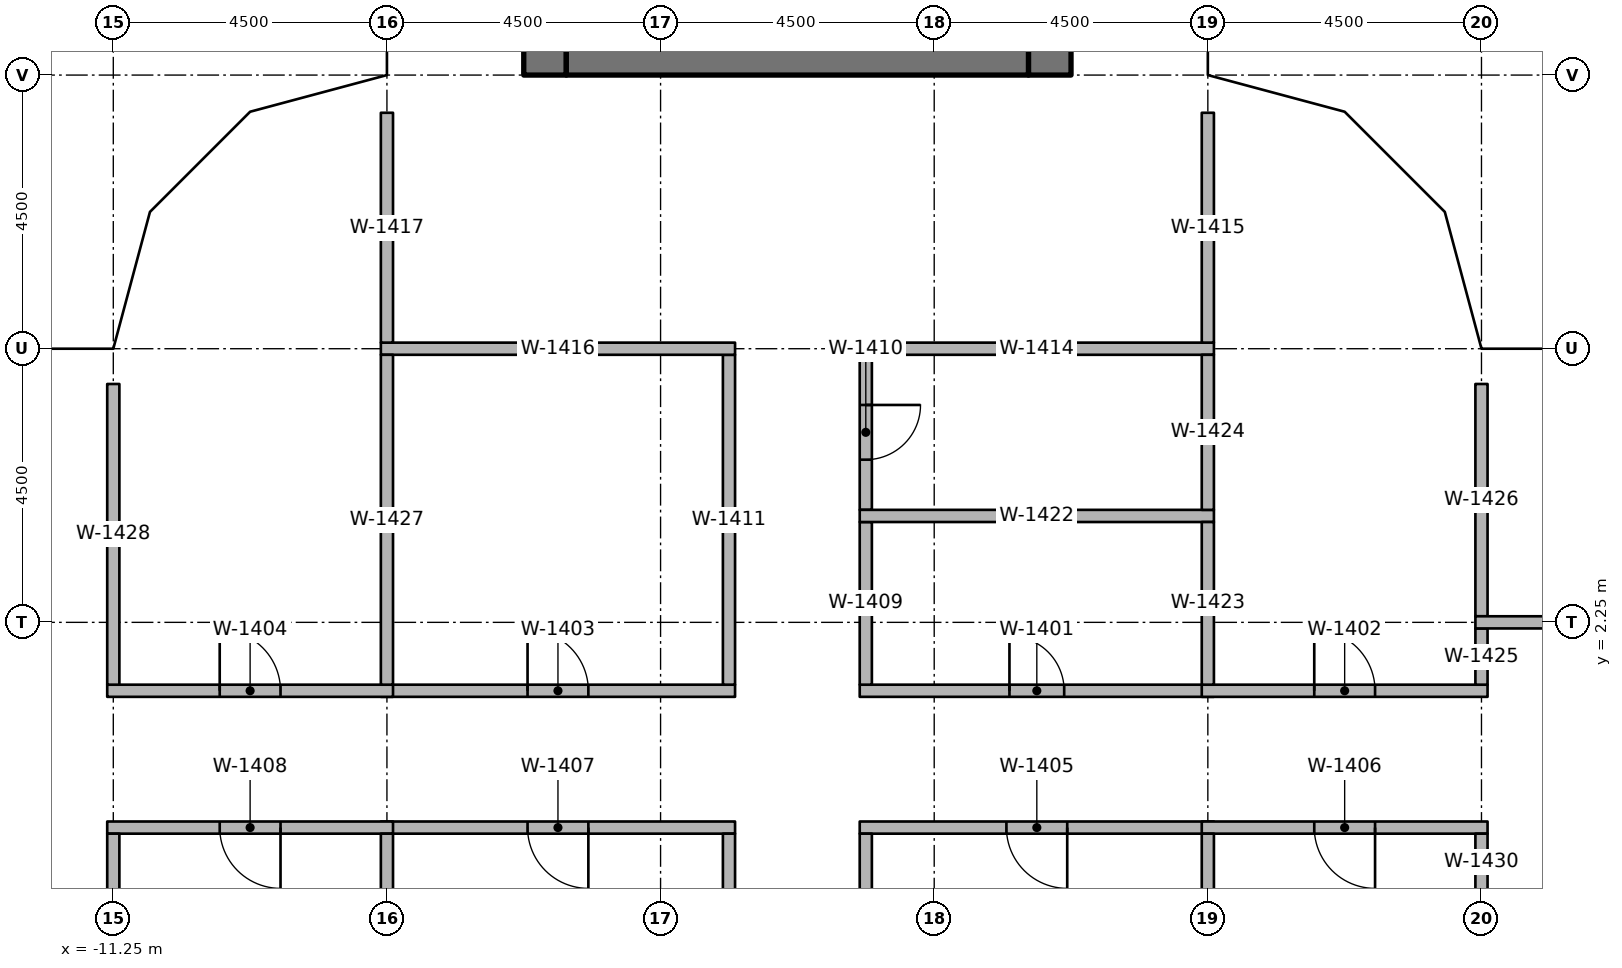
"""IFC4 building model, lengths in metres.
Left out: names, types, materials, properties, quantities, classifications, styles, units other than length and angle.
Written with IfcOpenShell. Run it as: python <this file> out.ifc"""

import sys

from ifc_helpers import new_model, si_unit, direction, frame, frame_2d, origin, origin_2d, place, context, subcontext, project, spatial, rectangle, extrude, element, fill, save


model = new_model("IFC4")
c1 = context("Model", 3, precision=1e-05, world=origin(), true_north=direction((0.0, 1.0)))
c2 = subcontext(c1, "Body", "Model", "MODEL_VIEW")
j1 = project(units=[si_unit("LENGTHUNIT", "METRE"), si_unit("PLANEANGLEUNIT", "RADIAN")], contexts=[c1])
p1 = place(None, origin())
s1 = spatial("IfcSite", under=j1, at=p1, CompositionType="ELEMENT")
p2 = place(p1, origin())
s2 = spatial("IfcBuilding", under=s1, at=p2, CompositionType="ELEMENT")
p3 = place(p2, frame((0.0, 0.0, 141.0)))
s3 = spatial("IfcBuildingStorey", under=s2, at=p3, CompositionType="ELEMENT", Elevation=141.0)
for number, where, z_axis, x_axis in (
    (1, (-10.75, 6.25, 0.0), (0.0, 0.0, 1.0), (1.0, 0.0, 0.0)),
    (2, (-6.25, 6.25, 0.0), (0.0, 0.0, 1.0), (1.0, 0.0, 0.0)),
    (3, (-6.25, 10.75, 0.0), (0.0, 0.0, 1.0), (1.0, 0.0, 0.0)),
    (4, (6.25, 6.25, 0.0), (0.0, 0.0, 1.0), (1.0, 0.0, 0.0)),
    (5, (6.25, 10.75, 0.0), (0.0, 0.0, 1.0), (1.0, 0.0, 0.0)),
    (6, (10.75, 6.25, 0.0), (0.0, 0.0, 1.0), (1.0, 0.0, 0.0)),
):
    element("IfcColumn", number, at=place(p3, frame(where, z_axis=z_axis, x_axis=x_axis)), inside=s3, PredefinedType="COLUMN", context=c2, shape_type="SweptSolid", body=[
        extrude(rectangle(XDim=0.8, YDim=0.8, at=origin_2d()), origin(), (0.0, 0.0, 1.0), 3.65),
    ])
p4 = place(p3, frame((-4.15, 11.25, 0.0), z_axis=(0.0, 0.0, 1.0), x_axis=(0.0, 1.0, 0.0)))
e7 = element("IfcWall", 7, at=p4, inside=s3, PredefinedType="SHEAR", context=c2, shape_type="SweptSolid", body=[
    extrude(rectangle(XDim=15.0, YDim=0.7, at=frame_2d((7.5, 0.0))), origin(), (0.0, 0.0, 1.0), 3.8),
])
p5 = place(p4, frame((7.15, 0.0, 0.0)))
e8 = element("IfcOpeningElement", 8, at=p5, cuts=e7, PredefinedType="OPENING", context=c2, shape_type="SweptSolid", body=[
    extrude(rectangle(XDim=1.5, YDim=2.3, at=frame_2d((0.75, 1.15))), frame((0.0, 0.36, 0.0), z_axis=(0.0, -1.0, 0.0), x_axis=(1.0, 0.0, 0.0)), (0.0, 0.0, 1.0), 0.72),
])
p6 = place(p4, frame((13.9, 0.0, 0.0)))
e9 = element("IfcOpeningElement", 9, at=p6, cuts=e7, PredefinedType="OPENING", context=c2, shape_type="SweptSolid", body=[
    extrude(rectangle(XDim=0.9, YDim=2.1, at=frame_2d((0.45, 1.05))), frame((0.0, 0.36, 0.0), z_axis=(0.0, -1.0, 0.0), x_axis=(1.0, 0.0, 0.0)), (0.0, 0.0, 1.0), 0.72),
])
p7 = place(p4, frame((1.15, 0.0, 0.0)))
e10 = element("IfcOpeningElement", 10, at=p7, cuts=e7, PredefinedType="OPENING", context=c2, shape_type="SweptSolid", body=[
    extrude(rectangle(XDim=1.2, YDim=2.1, at=frame_2d((0.6, 1.05))), frame((0.0, 0.36, 0.0), z_axis=(0.0, -1.0, 0.0), x_axis=(1.0, 0.0, 0.0)), (0.0, 0.0, 1.0), 0.72),
])
p8 = place(p3, frame((4.15, 11.25, 0.0), z_axis=(0.0, 0.0, 1.0), x_axis=(0.0, 1.0, 0.0)))
e11 = element("IfcWall", 11, at=p8, inside=s3, PredefinedType="SHEAR", context=c2, shape_type="SweptSolid", body=[
    extrude(rectangle(XDim=15.0, YDim=0.7, at=frame_2d((7.5, 0.0))), origin(), (0.0, 0.0, 1.0), 3.8),
])
p9 = place(p8, frame((7.15, 0.0, 0.0)))
e12 = element("IfcOpeningElement", 12, at=p9, cuts=e11, PredefinedType="OPENING", context=c2, shape_type="SweptSolid", body=[
    extrude(rectangle(XDim=1.5, YDim=2.3, at=frame_2d((0.75, 1.15))), frame((0.0, 0.36, 0.0), z_axis=(0.0, -1.0, 0.0), x_axis=(1.0, 0.0, 0.0)), (0.0, 0.0, 1.0), 0.72),
])
p10 = place(p8, frame((5.55, 0.0, 0.0)))
e13 = element("IfcOpeningElement", 13, at=p10, cuts=e11, PredefinedType="OPENING", context=c2, shape_type="SweptSolid", body=[
    extrude(rectangle(XDim=1.2, YDim=2.1, at=frame_2d((0.6, 1.05))), frame((0.0, 0.36, 0.0), z_axis=(0.0, -1.0, 0.0), x_axis=(1.0, 0.0, 0.0)), (0.0, 0.0, 1.0), 0.72),
])
p11 = place(p3, frame((-3.8, 11.6, 0.0), z_axis=(0.0, 0.0, 1.0), x_axis=(1.0, 0.0, 0.0)))
e14 = element("IfcWall", 14, at=p11, inside=s3, PredefinedType="SHEAR", context=c2, shape_type="SweptSolid", body=[
    extrude(rectangle(XDim=7.6, YDim=0.7, at=frame_2d((3.8, 0.0))), origin(), (0.0, 0.0, 1.0), 3.8),
])
p12 = place(p3, frame((1.025, 1.125, 0.0), z_axis=(0.0, 0.0, 1.0), x_axis=(1.0, 0.0, 0.0)))
e15 = element("IfcWall", 15, at=p12, inside=s3, PredefinedType="PARTITIONING", context=c2, shape_type="SweptSolid", body=[
    extrude(rectangle(XDim=5.825, YDim=0.2, at=frame_2d((2.913, 0.0))), origin(), (0.0, 0.0, 1.0), 2.75),
])
p13 = place(p12, frame((2.462, 0.0, 0.0)))
e16 = element("IfcOpeningElement", 16, at=p13, cuts=e15, PredefinedType="OPENING", context=c2, shape_type="SweptSolid", body=[
    extrude(rectangle(XDim=0.9, YDim=2.1, at=frame_2d((0.45, 1.05))), frame((0.0, 0.11, 0.0), z_axis=(0.0, -1.0, 0.0), x_axis=(1.0, 0.0, 0.0)), (0.0, 0.0, 1.0), 0.22),
])
p14 = place(p3, frame((6.65, 1.125, 0.0), z_axis=(0.0, 0.0, 1.0), x_axis=(1.0, 0.0, 0.0)))
e17 = element("IfcWall", 17, at=p14, inside=s3, PredefinedType="PARTITIONING", context=c2, shape_type="SweptSolid", body=[
    extrude(rectangle(XDim=4.7, YDim=0.2, at=frame_2d((2.35, 0.0))), origin(), (0.0, 0.0, 1.0), 2.75),
])
p15 = place(p14, frame((1.85, 0.0, 0.0)))
e18 = element("IfcOpeningElement", 18, at=p15, cuts=e17, PredefinedType="OPENING", context=c2, shape_type="SweptSolid", body=[
    extrude(rectangle(XDim=1.0, YDim=2.1, at=frame_2d((0.5, 1.05))), frame((0.0, 0.11, 0.0), z_axis=(0.0, -1.0, 0.0), x_axis=(1.0, 0.0, 0.0)), (0.0, 0.0, 1.0), 0.22),
])
p16 = place(p3, frame((-6.85, 1.125, 0.0), z_axis=(0.0, 0.0, 1.0), x_axis=(1.0, 0.0, 0.0)))
e19 = element("IfcWall", 19, at=p16, inside=s3, PredefinedType="PARTITIONING", context=c2, shape_type="SweptSolid", body=[
    extrude(rectangle(XDim=5.825, YDim=0.2, at=frame_2d((2.913, 0.0))), origin(), (0.0, 0.0, 1.0), 2.75),
])
p17 = place(p16, frame((2.413, 0.0, 0.0)))
e20 = element("IfcOpeningElement", 20, at=p17, cuts=e19, PredefinedType="OPENING", context=c2, shape_type="SweptSolid", body=[
    extrude(rectangle(XDim=1.0, YDim=2.1, at=frame_2d((0.5, 1.05))), frame((0.0, 0.11, 0.0), z_axis=(0.0, -1.0, 0.0), x_axis=(1.0, 0.0, 0.0)), (0.0, 0.0, 1.0), 0.22),
])
p18 = place(p3, frame((-11.35, 1.125, 0.0), z_axis=(0.0, 0.0, 1.0), x_axis=(1.0, 0.0, 0.0)))
e21 = element("IfcWall", 21, at=p18, inside=s3, PredefinedType="PARTITIONING", context=c2, shape_type="SweptSolid", body=[
    extrude(rectangle(XDim=4.7, YDim=0.2, at=frame_2d((2.35, 0.0))), origin(), (0.0, 0.0, 1.0), 2.75),
])
p19 = place(p18, frame((1.85, 0.0, 0.0)))
e22 = element("IfcOpeningElement", 22, at=p19, cuts=e21, PredefinedType="OPENING", context=c2, shape_type="SweptSolid", body=[
    extrude(rectangle(XDim=1.0, YDim=2.1, at=frame_2d((0.5, 1.05))), frame((0.0, 0.11, 0.0), z_axis=(0.0, -1.0, 0.0), x_axis=(1.0, 0.0, 0.0)), (0.0, 0.0, 1.0), 0.22),
])
p20 = place(p3, frame((6.85, -1.125, 0.0), z_axis=(0.0, 0.0, 1.0), x_axis=(-1.0, 0.0, 0.0)))
e23 = element("IfcWall", 23, at=p20, inside=s3, PredefinedType="PARTITIONING", context=c2, shape_type="SweptSolid", body=[
    extrude(rectangle(XDim=5.825, YDim=0.2, at=frame_2d((2.913, 0.0))), origin(), (0.0, 0.0, 1.0), 2.75),
])
p21 = place(p20, frame((2.413, 0.0, 0.0)))
e24 = element("IfcOpeningElement", 24, at=p21, cuts=e23, PredefinedType="OPENING", context=c2, shape_type="SweptSolid", body=[
    extrude(rectangle(XDim=1.0, YDim=2.1, at=frame_2d((0.5, 1.05))), frame((0.0, 0.11, 0.0), z_axis=(0.0, -1.0, 0.0), x_axis=(1.0, 0.0, 0.0)), (0.0, 0.0, 1.0), 0.22),
])
p22 = place(p3, frame((11.35, -1.125, 0.0), z_axis=(0.0, 0.0, 1.0), x_axis=(-1.0, 0.0, 0.0)))
e25 = element("IfcWall", 25, at=p22, inside=s3, PredefinedType="PARTITIONING", context=c2, shape_type="SweptSolid", body=[
    extrude(rectangle(XDim=4.7, YDim=0.2, at=frame_2d((2.35, 0.0))), origin(), (0.0, 0.0, 1.0), 2.75),
])
p23 = place(p22, frame((1.85, 0.0, 0.0)))
e26 = element("IfcOpeningElement", 26, at=p23, cuts=e25, PredefinedType="OPENING", context=c2, shape_type="SweptSolid", body=[
    extrude(rectangle(XDim=1.0, YDim=2.1, at=frame_2d((0.5, 1.05))), frame((0.0, 0.11, 0.0), z_axis=(0.0, -1.0, 0.0), x_axis=(1.0, 0.0, 0.0)), (0.0, 0.0, 1.0), 0.22),
])
p24 = place(p3, frame((-1.025, -1.125, 0.0), z_axis=(0.0, 0.0, 1.0), x_axis=(-1.0, 0.0, 0.0)))
e27 = element("IfcWall", 27, at=p24, inside=s3, PredefinedType="PARTITIONING", context=c2, shape_type="SweptSolid", body=[
    extrude(rectangle(XDim=5.825, YDim=0.2, at=frame_2d((2.913, 0.0))), origin(), (0.0, 0.0, 1.0), 2.75),
])
p25 = place(p24, frame((2.413, 0.0, 0.0)))
e28 = element("IfcOpeningElement", 28, at=p25, cuts=e27, PredefinedType="OPENING", context=c2, shape_type="SweptSolid", body=[
    extrude(rectangle(XDim=1.0, YDim=2.1, at=frame_2d((0.5, 1.05))), frame((0.0, 0.11, 0.0), z_axis=(0.0, -1.0, 0.0), x_axis=(1.0, 0.0, 0.0)), (0.0, 0.0, 1.0), 0.22),
])
p26 = place(p3, frame((-6.65, -1.125, 0.0), z_axis=(0.0, 0.0, 1.0), x_axis=(-1.0, 0.0, 0.0)))
e29 = element("IfcWall", 29, at=p26, inside=s3, PredefinedType="PARTITIONING", context=c2, shape_type="SweptSolid", body=[
    extrude(rectangle(XDim=4.7, YDim=0.2, at=frame_2d((2.35, 0.0))), origin(), (0.0, 0.0, 1.0), 2.75),
])
p27 = place(p26, frame((1.85, 0.0, 0.0)))
e30 = element("IfcOpeningElement", 30, at=p27, cuts=e29, PredefinedType="OPENING", context=c2, shape_type="SweptSolid", body=[
    extrude(rectangle(XDim=1.0, YDim=2.1, at=frame_2d((0.5, 1.05))), frame((0.0, 0.11, 0.0), z_axis=(0.0, -1.0, 0.0), x_axis=(1.0, 0.0, 0.0)), (0.0, 0.0, 1.0), 0.22),
])
p28 = place(p3, frame((1.125, 1.225, 0.0), z_axis=(0.0, 0.0, 1.0), x_axis=(0.0, 1.0, 0.0)))
e31 = element("IfcWall", 31, at=p28, inside=s3, PredefinedType="PARTITIONING", context=c2, shape_type="SweptSolid", body=[
    extrude(rectangle(XDim=2.675, YDim=0.2, at=frame_2d((1.337, 0.0))), origin(), (0.0, 0.0, 1.0), 2.75),
])
p29 = place(p3, frame((1.125, 6.65, 0.0), z_axis=(0.0, 0.0, 1.0), x_axis=(0.0, -1.0, 0.0)))
e32 = element("IfcWall", 32, at=p29, inside=s3, PredefinedType="PARTITIONING", context=c2, shape_type="SweptSolid", body=[
    extrude(rectangle(XDim=2.55, YDim=0.2, at=frame_2d((1.275, 0.0))), origin(), (0.0, 0.0, 1.0), 2.75),
])
p30 = place(p29, frame((0.825, 0.0, 0.0)))
e33 = element("IfcOpeningElement", 33, at=p30, cuts=e32, PredefinedType="OPENING", context=c2, shape_type="SweptSolid", body=[
    extrude(rectangle(XDim=0.9, YDim=2.1, at=frame_2d((0.45, 1.05))), frame((0.0, 0.11, 0.0), z_axis=(0.0, -1.0, 0.0), x_axis=(1.0, 0.0, 0.0)), (0.0, 0.0, 1.0), 0.22),
])
for number, where, z_axis, x_axis in (
    (34, (-1.125, 1.225, 0.0), (0.0, 0.0, 1.0), (0.0, 1.0, 0.0)),
    (35, (1.125, -6.65, 0.0), (0.0, 0.0, 1.0), (0.0, 1.0, 0.0)),
    (36, (-1.125, -6.65, 0.0), (0.0, 0.0, 1.0), (0.0, 1.0, 0.0)),
):
    element("IfcWall", number, at=place(p3, frame(where, z_axis=z_axis, x_axis=x_axis)), inside=s3, PredefinedType="PARTITIONING", context=c2, shape_type="SweptSolid", body=[
        extrude(rectangle(XDim=5.425, YDim=0.2, at=frame_2d((2.712, 0.0))), origin(), (0.0, 0.0, 1.0), 2.75),
    ])
p31 = place(p3, frame((1.025, 6.75, 0.0), z_axis=(0.0, 0.0, 1.0), x_axis=(1.0, 0.0, 0.0)))
e37 = element("IfcWall", 37, at=p31, inside=s3, PredefinedType="PARTITIONING", context=c2, shape_type="SweptSolid", body=[
    extrude(rectangle(XDim=5.825, YDim=0.2, at=frame_2d((2.913, 0.0))), origin(), (0.0, 0.0, 1.0), 2.75),
])
p32 = place(p3, frame((6.75, 6.85, 0.0), z_axis=(0.0, 0.0, 1.0), x_axis=(0.0, 1.0, 0.0)))
e38 = element("IfcWall", 38, at=p32, inside=s3, PredefinedType="PARTITIONING", context=c2, shape_type="SweptSolid", body=[
    extrude(rectangle(XDim=3.78, YDim=0.2, at=frame_2d((1.89, 0.0))), origin(), (0.0, 0.0, 1.0), 2.75),
])
p33 = place(p3, frame((-6.85, 6.75, 0.0), z_axis=(0.0, 0.0, 1.0), x_axis=(1.0, 0.0, 0.0)))
e39 = element("IfcWall", 39, at=p33, inside=s3, PredefinedType="PARTITIONING", context=c2, shape_type="SweptSolid", body=[
    extrude(rectangle(XDim=5.825, YDim=0.2, at=frame_2d((2.913, 0.0))), origin(), (0.0, 0.0, 1.0), 2.75),
])
p34 = place(p3, frame((-6.75, 6.85, 0.0), z_axis=(0.0, 0.0, 1.0), x_axis=(0.0, 1.0, 0.0)))
e40 = element("IfcWall", 40, at=p34, inside=s3, PredefinedType="PARTITIONING", context=c2, shape_type="SweptSolid", body=[
    extrude(rectangle(XDim=3.78, YDim=0.2, at=frame_2d((1.89, 0.0))), origin(), (0.0, 0.0, 1.0), 2.75),
])
p35 = place(p3, frame((1.025, 4.0, 0.0), z_axis=(0.0, 0.0, 1.0), x_axis=(1.0, 0.0, 0.0)))
e41 = element("IfcWall", 41, at=p35, inside=s3, PredefinedType="PARTITIONING", context=c2, shape_type="SweptSolid", body=[
    extrude(rectangle(XDim=5.825, YDim=0.2, at=frame_2d((2.913, 0.0))), origin(), (0.0, 0.0, 1.0), 2.75),
])
p36 = place(p3, frame((6.75, 1.225, 0.0), z_axis=(0.0, 0.0, 1.0), x_axis=(0.0, 1.0, 0.0)))
e42 = element("IfcWall", 42, at=p36, inside=s3, PredefinedType="PARTITIONING", context=c2, shape_type="SweptSolid", body=[
    extrude(rectangle(XDim=2.675, YDim=0.2, at=frame_2d((1.337, 0.0))), origin(), (0.0, 0.0, 1.0), 2.75),
])
p37 = place(p3, frame((6.75, 4.1, 0.0), z_axis=(0.0, 0.0, 1.0), x_axis=(0.0, 1.0, 0.0)))
e43 = element("IfcWall", 43, at=p37, inside=s3, PredefinedType="PARTITIONING", context=c2, shape_type="SweptSolid", body=[
    extrude(rectangle(XDim=2.55, YDim=0.2, at=frame_2d((1.275, 0.0))), origin(), (0.0, 0.0, 1.0), 2.75),
])
p38 = place(p3, frame((11.25, 1.225, 0.0), z_axis=(0.0, 0.0, 1.0), x_axis=(0.0, 1.0, 0.0)))
e44 = element("IfcWall", 44, at=p38, inside=s3, PredefinedType="PARTITIONING", context=c2, shape_type="SweptSolid", body=[
    extrude(rectangle(XDim=0.925, YDim=0.2, at=frame_2d((0.462, 0.0))), origin(), (0.0, 0.0, 1.0), 2.75),
])
p39 = place(p3, frame((11.25, 2.35, 0.0), z_axis=(0.0, 0.0, 1.0), x_axis=(0.0, 1.0, 0.0)))
e45 = element("IfcWall", 45, at=p39, inside=s3, PredefinedType="PARTITIONING", context=c2, shape_type="SweptSolid", body=[
    extrude(rectangle(XDim=3.82, YDim=0.2, at=frame_2d((1.91, 0.0))), origin(), (0.0, 0.0, 1.0), 2.75),
])
p40 = place(p3, frame((-6.75, 1.225, 0.0), z_axis=(0.0, 0.0, 1.0), x_axis=(0.0, 1.0, 0.0)))
e46 = element("IfcWall", 46, at=p40, inside=s3, PredefinedType="PARTITIONING", context=c2, shape_type="SweptSolid", body=[
    extrude(rectangle(XDim=5.425, YDim=0.2, at=frame_2d((2.712, 0.0))), origin(), (0.0, 0.0, 1.0), 2.75),
])
p41 = place(p3, frame((-11.25, 1.225, 0.0), z_axis=(0.0, 0.0, 1.0), x_axis=(0.0, 1.0, 0.0)))
e47 = element("IfcWall", 47, at=p41, inside=s3, PredefinedType="PARTITIONING", context=c2, shape_type="SweptSolid", body=[
    extrude(rectangle(XDim=4.945, YDim=0.2, at=frame_2d((2.472, 0.0))), origin(), (0.0, 0.0, 1.0), 2.75),
])
p42 = place(p3, frame((6.75, -6.65, 0.0), z_axis=(0.0, 0.0, 1.0), x_axis=(0.0, 1.0, 0.0)))
e48 = element("IfcWall", 48, at=p42, inside=s3, PredefinedType="PARTITIONING", context=c2, shape_type="SweptSolid", body=[
    extrude(rectangle(XDim=5.425, YDim=0.2, at=frame_2d((2.712, 0.0))), origin(), (0.0, 0.0, 1.0), 2.75),
])
p43 = place(p3, frame((11.25, -2.15, 0.0), z_axis=(0.0, 0.0, 1.0), x_axis=(0.0, 1.0, 0.0)))
e49 = element("IfcWall", 49, at=p43, inside=s3, PredefinedType="PARTITIONING", context=c2, shape_type="SweptSolid", body=[
    extrude(rectangle(XDim=0.925, YDim=0.2, at=frame_2d((0.462, 0.0))), origin(), (0.0, 0.0, 1.0), 2.75),
])
for number, where, z_axis, x_axis in (
    (50, (-6.75, -6.65, 0.0), (0.0, 0.0, 1.0), (0.0, 1.0, 0.0)),
    (51, (-11.25, -6.65, 0.0), (0.0, 0.0, 1.0), (0.0, 1.0, 0.0)),
):
    element("IfcWall", number, at=place(p3, frame(where, z_axis=z_axis, x_axis=x_axis)), inside=s3, PredefinedType="PARTITIONING", context=c2, shape_type="SweptSolid", body=[
        extrude(rectangle(XDim=5.425, YDim=0.2, at=frame_2d((2.712, 0.0))), origin(), (0.0, 0.0, 1.0), 2.75),
    ])
p44 = place(p3, frame((11.15, 2.25, 0.0), z_axis=(0.0, 0.0, 1.0), x_axis=(1.0, 0.0, 0.0)))
e52 = element("IfcWall", 52, at=p44, inside=s3, PredefinedType="PARTITIONING", context=c2, shape_type="SweptSolid", body=[
    extrude(rectangle(XDim=4.7, YDim=0.2, at=frame_2d((2.35, 0.0))), origin(), (0.0, 0.0, 1.0), 2.75),
])
p45 = place(p44, frame((1.85, 0.0, 0.0)))
e53 = element("IfcOpeningElement", 53, at=p45, cuts=e52, PredefinedType="OPENING", context=c2, shape_type="SweptSolid", body=[
    extrude(rectangle(XDim=1.0, YDim=2.1, at=frame_2d((0.5, 1.05))), frame((0.0, 0.11, 0.0), z_axis=(0.0, -1.0, 0.0), x_axis=(1.0, 0.0, 0.0)), (0.0, 0.0, 1.0), 0.22),
])
p46 = place(p13, origin())
e54 = element("IfcDoor", 54, at=p46, inside=s3, OperationType="SINGLE_SWING_RIGHT", PredefinedType="DOOR", context=c2, shape_type="SweptSolid", body=[
    extrude(rectangle(XDim=0.9, YDim=2.1, at=frame_2d((0.45, 1.05))), frame((0.0, 0.025, 0.0), z_axis=(0.0, -1.0, 0.0), x_axis=(1.0, 0.0, 0.0)), (0.0, 0.0, 1.0), 0.05),
])
fill(e16, e54)
p47 = place(p30, origin())
e55 = element("IfcDoor", 55, at=p47, inside=s3, OperationType="SINGLE_SWING_RIGHT", PredefinedType="DOOR", context=c2, shape_type="SweptSolid", body=[
    extrude(rectangle(XDim=0.9, YDim=2.1, at=frame_2d((0.45, 1.05))), frame((0.0, 0.025, 0.0), z_axis=(0.0, -1.0, 0.0), x_axis=(1.0, 0.0, 0.0)), (0.0, 0.0, 1.0), 0.05),
])
fill(e33, e55)
p48 = place(p15, origin())
e56 = element("IfcDoor", 56, at=p48, inside=s3, OperationType="SINGLE_SWING_RIGHT", PredefinedType="DOOR", context=c2, shape_type="SweptSolid", body=[
    extrude(rectangle(XDim=1.0, YDim=2.1, at=frame_2d((0.5, 1.05))), frame((0.0, 0.025, 0.0), z_axis=(0.0, -1.0, 0.0), x_axis=(1.0, 0.0, 0.0)), (0.0, 0.0, 1.0), 0.05),
])
fill(e18, e56)
p49 = place(p17, origin())
e57 = element("IfcDoor", 57, at=p49, inside=s3, OperationType="SINGLE_SWING_RIGHT", PredefinedType="DOOR", context=c2, shape_type="SweptSolid", body=[
    extrude(rectangle(XDim=1.0, YDim=2.1, at=frame_2d((0.5, 1.05))), frame((0.0, 0.025, 0.0), z_axis=(0.0, -1.0, 0.0), x_axis=(1.0, 0.0, 0.0)), (0.0, 0.0, 1.0), 0.05),
])
fill(e20, e57)
p50 = place(p19, origin())
e58 = element("IfcDoor", 58, at=p50, inside=s3, OperationType="SINGLE_SWING_RIGHT", PredefinedType="DOOR", context=c2, shape_type="SweptSolid", body=[
    extrude(rectangle(XDim=1.0, YDim=2.1, at=frame_2d((0.5, 1.05))), frame((0.0, 0.025, 0.0), z_axis=(0.0, -1.0, 0.0), x_axis=(1.0, 0.0, 0.0)), (0.0, 0.0, 1.0), 0.05),
])
fill(e22, e58)
p51 = place(p21, origin())
e59 = element("IfcDoor", 59, at=p51, inside=s3, OperationType="SINGLE_SWING_RIGHT", PredefinedType="DOOR", context=c2, shape_type="SweptSolid", body=[
    extrude(rectangle(XDim=1.0, YDim=2.1, at=frame_2d((0.5, 1.05))), frame((0.0, 0.025, 0.0), z_axis=(0.0, -1.0, 0.0), x_axis=(1.0, 0.0, 0.0)), (0.0, 0.0, 1.0), 0.05),
])
fill(e24, e59)
p52 = place(p23, origin())
e60 = element("IfcDoor", 60, at=p52, inside=s3, OperationType="SINGLE_SWING_RIGHT", PredefinedType="DOOR", context=c2, shape_type="SweptSolid", body=[
    extrude(rectangle(XDim=1.0, YDim=2.1, at=frame_2d((0.5, 1.05))), frame((0.0, 0.025, 0.0), z_axis=(0.0, -1.0, 0.0), x_axis=(1.0, 0.0, 0.0)), (0.0, 0.0, 1.0), 0.05),
])
fill(e26, e60)
p53 = place(p25, origin())
e61 = element("IfcDoor", 61, at=p53, inside=s3, OperationType="SINGLE_SWING_RIGHT", PredefinedType="DOOR", context=c2, shape_type="SweptSolid", body=[
    extrude(rectangle(XDim=1.0, YDim=2.1, at=frame_2d((0.5, 1.05))), frame((0.0, 0.025, 0.0), z_axis=(0.0, -1.0, 0.0), x_axis=(1.0, 0.0, 0.0)), (0.0, 0.0, 1.0), 0.05),
])
fill(e28, e61)
p54 = place(p27, origin())
e62 = element("IfcDoor", 62, at=p54, inside=s3, OperationType="SINGLE_SWING_RIGHT", PredefinedType="DOOR", context=c2, shape_type="SweptSolid", body=[
    extrude(rectangle(XDim=1.0, YDim=2.1, at=frame_2d((0.5, 1.05))), frame((0.0, 0.025, 0.0), z_axis=(0.0, -1.0, 0.0), x_axis=(1.0, 0.0, 0.0)), (0.0, 0.0, 1.0), 0.05),
])
fill(e30, e62)
save(model, sys.argv[1])
